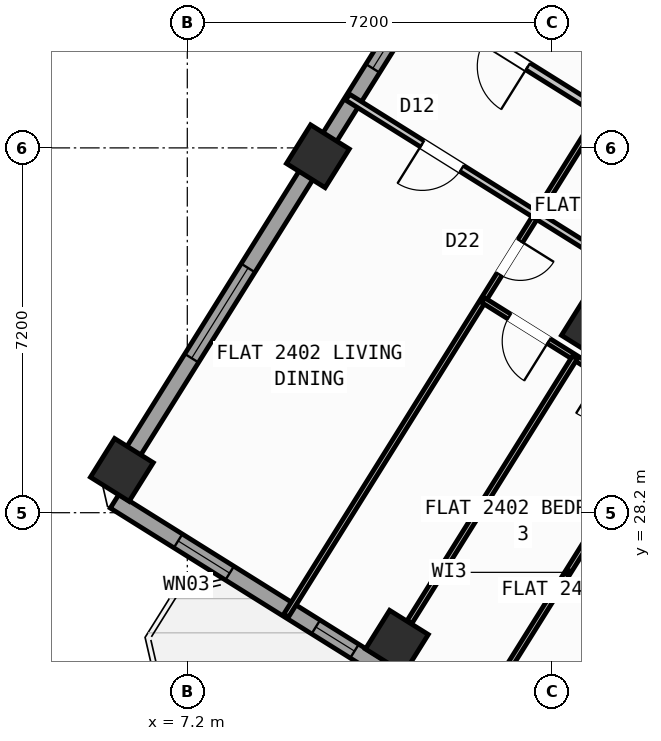
"""IFC4 building model, lengths in metres.
Left out: names, types, materials, properties, quantities, classifications, styles, units other than length and angle.
Written with IfcOpenShell. Run it as: python <this file> out.ifc"""

import sys

from ifc_helpers import new_model, si_unit, direction, frame, frame_2d, origin, origin_2d, place, context, subcontext, project, spatial, rectangle, hollow_rectangle, extrude, source, transform, mapped, element, fill, save


model = new_model("IFC4")
c1 = context("Model", 3, precision=1e-05, world=origin(), true_north=direction((0.0, 1.0)))
c2 = subcontext(c1, "Body", "Model", "MODEL_VIEW")
j1 = project(units=[si_unit("LENGTHUNIT", "METRE"), si_unit("PLANEANGLEUNIT", "RADIAN")], contexts=[c1])
p1 = place(None, origin())
s1 = spatial("IfcSite", under=j1, at=p1, CompositionType="ELEMENT")
p2 = place(p1, origin())
s2 = spatial("IfcBuilding", under=s1, at=p2, CompositionType="ELEMENT")
p3 = place(p2, frame((0.0, 0.0, 97.2)))
s3 = spatial("IfcBuildingStorey", under=s2, at=p3, CompositionType="ELEMENT", Elevation=97.2)
m1 = source(origin(), c2, "Body", "SweptSolid", [
    extrude(hollow_rectangle(XDim=0.9, YDim=0.9, WallThickness=0.036, at=origin_2d()), origin(), (0.0, 0.0, 1.0), 3.6),
])
for number, where, z_axis, x_axis in (
    (1, (15.205, 31.844, 0.0), (0.0, 0.0, 1.0), (-0.848, 0.53, 0.0)),
    (2, (11.336, 25.653, 0.0), (0.0, 0.0, 1.0), (-0.848, 0.53, 0.0)),
    (3, (9.777, 35.235, 0.0), (0.0, 0.0, 1.0), (-0.848, 0.53, 0.0)),
    (4, (5.909, 29.044, 0.0), (0.0, 0.0, 1.0), (-0.848, 0.53, 0.0)),
):
    element("IfcColumn", number, at=place(p3, frame(where, z_axis=z_axis, x_axis=x_axis)), inside=s3, PredefinedType="COLUMN", context=c2, shape_type="MappedRepresentation", body=[
        mapped(m1, transform((0.0, 0.0, 0.0), scale=1.0)),
    ])
p4 = place(p3, frame((31.76, 12.183, 0.0), z_axis=(0.0, 0.0, 1.0), x_axis=(-0.848047074256, 0.529920899612, 0.0)))
e5 = element("IfcWall", 5, at=p4, inside=s3, PredefinedType="STANDARD", context=c2, shape_type="SweptSolid", body=[
    extrude(rectangle(XDim=30.652, YDim=0.32, at=frame_2d((15.326, 0.0))), origin(), (0.0, 0.0, 1.0), 3.32),
])
p5 = place(p4, frame((15.153, 0.0, 0.0)))
e6 = element("IfcOpeningElement", 6, at=p5, cuts=e5, PredefinedType="OPENING", context=c2, shape_type="SweptSolid", body=[
    extrude(rectangle(XDim=1.2, YDim=2.15, at=frame_2d((0.6, 1.075))), frame((0.0, 0.17, 0.0), z_axis=(0.0, -1.0, 0.0), x_axis=(1.0, 0.0, 0.0)), (0.0, 0.0, 1.0), 0.34),
])
p6 = place(p4, frame((2.002, 0.0, 0.8)))
e7 = element("IfcOpeningElement", 7, at=p6, cuts=e5, PredefinedType="OPENING", context=c2, shape_type="SweptSolid", body=[
    extrude(rectangle(XDim=2.1, YDim=1.55, at=frame_2d((1.05, 0.775))), frame((0.0, 0.17, 0.0), z_axis=(0.0, -1.0, 0.0), x_axis=(1.0, 0.0, 0.0)), (0.0, 0.0, 1.0), 0.34),
])
p7 = place(p4, frame((7.206, 0.0, 0.8)))
e8 = element("IfcOpeningElement", 8, at=p7, cuts=e5, PredefinedType="OPENING", context=c2, shape_type="SweptSolid", body=[
    extrude(rectangle(XDim=2.1, YDim=1.55, at=frame_2d((1.05, 0.775))), frame((0.0, 0.17, 0.0), z_axis=(0.0, -1.0, 0.0), x_axis=(1.0, 0.0, 0.0)), (0.0, 0.0, 1.0), 0.34),
])
p8 = place(p4, frame((12.648, 0.0, 1.0)))
e9 = element("IfcOpeningElement", 9, at=p8, cuts=e5, PredefinedType="OPENING", context=c2, shape_type="SweptSolid", body=[
    extrude(rectangle(XDim=0.9, YDim=1.25, at=frame_2d((0.45, 0.625))), frame((0.0, 0.17, 0.0), z_axis=(0.0, -1.0, 0.0), x_axis=(1.0, 0.0, 0.0)), (0.0, 0.0, 1.0), 0.34),
])
p9 = place(p4, frame((27.974, 0.0, 0.95)))
e10 = element("IfcOpeningElement", 10, at=p9, cuts=e5, PredefinedType="OPENING", context=c2, shape_type="SweptSolid", body=[
    extrude(rectangle(XDim=1.2, YDim=1.4, at=frame_2d((0.6, 0.7))), frame((0.0, 0.17, 0.0), z_axis=(0.0, -1.0, 0.0), x_axis=(1.0, 0.0, 0.0)), (0.0, 0.0, 1.0), 0.34),
])
p10 = place(p4, frame((18.347, 0.0, 1.0)))
e11 = element("IfcOpeningElement", 11, at=p10, cuts=e5, PredefinedType="OPENING", context=c2, shape_type="SweptSolid", body=[
    extrude(rectangle(XDim=0.9, YDim=1.25, at=frame_2d((0.45, 0.625))), frame((0.0, 0.17, 0.0), z_axis=(0.0, -1.0, 0.0), x_axis=(1.0, 0.0, 0.0)), (0.0, 0.0, 1.0), 0.34),
])
p11 = place(p4, frame((20.931, 0.0, 1.0)))
e12 = element("IfcOpeningElement", 12, at=p11, cuts=e5, PredefinedType="OPENING", context=c2, shape_type="SweptSolid", body=[
    extrude(rectangle(XDim=0.65, YDim=1.15, at=frame_2d((0.325, 0.575))), frame((0.0, 0.17, 0.0), z_axis=(0.0, -1.0, 0.0), x_axis=(1.0, 0.0, 0.0)), (0.0, 0.0, 1.0), 0.34),
])
p12 = place(p4, frame((22.938, 0.0, 1.0)))
e13 = element("IfcOpeningElement", 13, at=p12, cuts=e5, PredefinedType="OPENING", context=c2, shape_type="SweptSolid", body=[
    extrude(rectangle(XDim=0.9, YDim=1.25, at=frame_2d((0.45, 0.625))), frame((0.0, 0.17, 0.0), z_axis=(0.0, -1.0, 0.0), x_axis=(1.0, 0.0, 0.0)), (0.0, 0.0, 1.0), 0.34),
])
p13 = place(p4, frame((25.069, 0.0, 1.0)))
e14 = element("IfcOpeningElement", 14, at=p13, cuts=e5, PredefinedType="OPENING", context=c2, shape_type="SweptSolid", body=[
    extrude(rectangle(XDim=0.9, YDim=1.25, at=frame_2d((0.45, 0.625))), frame((0.0, 0.17, 0.0), z_axis=(0.0, -1.0, 0.0), x_axis=(1.0, 0.0, 0.0)), (0.0, 0.0, 1.0), 0.34),
])
p14 = place(p3, frame((5.7, 28.71, 0.0), z_axis=(0.0, 0.0, 1.0), x_axis=(0.529923711467, 0.8480453172, 0.0)))
e15 = element("IfcWall", 15, at=p14, inside=s3, PredefinedType="STANDARD", context=c2, shape_type="SweptSolid", body=[
    extrude(rectangle(XDim=21.587, YDim=0.32, at=frame_2d((10.794, 0.0))), origin(), (0.0, 0.0, 1.0), 2.745),
])
p15 = place(p14, frame((2.994, 0.0, 0.8)))
e16 = element("IfcOpeningElement", 16, at=p15, cuts=e15, PredefinedType="OPENING", context=c2, shape_type="SweptSolid", body=[
    extrude(rectangle(XDim=2.1, YDim=1.55, at=frame_2d((1.05, 0.775))), frame((0.0, 0.17, 0.0), z_axis=(0.0, -1.0, 0.0), x_axis=(1.0, 0.0, 0.0)), (0.0, 0.0, 1.0), 0.34),
])
p16 = place(p14, frame((9.739, 0.0, 1.0)))
e17 = element("IfcOpeningElement", 17, at=p16, cuts=e15, PredefinedType="OPENING", context=c2, shape_type="SweptSolid", body=[
    extrude(rectangle(XDim=0.9, YDim=1.25, at=frame_2d((0.45, 0.625))), frame((0.0, 0.17, 0.0), z_axis=(0.0, -1.0, 0.0), x_axis=(1.0, 0.0, 0.0)), (0.0, 0.0, 1.0), 0.34),
])
p17 = place(p14, frame((18.639, 0.0, 0.85)))
e18 = element("IfcOpeningElement", 18, at=p17, cuts=e15, PredefinedType="OPENING", context=c2, shape_type="SweptSolid", body=[
    extrude(rectangle(XDim=1.5, YDim=1.5, at=frame_2d((0.75, 0.75))), frame((0.0, 0.17, 0.0), z_axis=(0.0, -1.0, 0.0), x_axis=(1.0, 0.0, 0.0)), (0.0, 0.0, 1.0), 0.34),
])
p18 = place(p3, frame((26.973, 31.447, 0.0), z_axis=(0.0, 0.0, 1.0), x_axis=(-0.848048310262, 0.529918921593, 0.0)))
e19 = element("IfcWall", 19, at=p18, inside=s3, PredefinedType="PARTITIONING", context=c2, shape_type="SweptSolid", body=[
    extrude(rectangle(XDim=16.73, YDim=0.16, at=frame_2d((8.365, 0.0))), origin(), (0.0, 0.0, 1.0), 3.31),
])
p19 = place(p18, frame((2.22, 0.0, 0.0)))
e20 = element("IfcOpeningElement", 20, at=p19, cuts=e19, PredefinedType="OPENING", context=c2, shape_type="SweptSolid", body=[
    extrude(rectangle(XDim=0.86, YDim=2.05, at=frame_2d((0.43, 1.025))), frame((0.0, 0.09, 0.0), z_axis=(0.0, -1.0, 0.0), x_axis=(1.0, 0.0, 0.0)), (0.0, 0.0, 1.0), 0.18),
])
p20 = place(p18, frame((5.28, 0.0, 0.0)))
e21 = element("IfcOpeningElement", 21, at=p20, cuts=e19, PredefinedType="OPENING", context=c2, shape_type="SweptSolid", body=[
    extrude(rectangle(XDim=1.0, YDim=2.1, at=frame_2d((0.5, 1.05))), frame((0.0, 0.09, 0.0), z_axis=(0.0, -1.0, 0.0), x_axis=(1.0, 0.0, 0.0)), (0.0, 0.0, 1.0), 0.18),
])
p21 = place(p3, frame((25.807, 29.582, 0.0), z_axis=(0.0, 0.0, 1.0), x_axis=(-0.848052408131, 0.529912363569, 0.0)))
e22 = element("IfcWall", 22, at=p21, inside=s3, PredefinedType="PARTITIONING", context=c2, shape_type="SweptSolid", body=[
    extrude(rectangle(XDim=16.73, YDim=0.16, at=frame_2d((8.365, 0.0))), origin(), (0.0, 0.0, 1.0), 3.31),
])
p22 = place(p21, frame((2.22, 0.0, 0.0)))
e23 = element("IfcOpeningElement", 23, at=p22, cuts=e22, PredefinedType="OPENING", context=c2, shape_type="SweptSolid", body=[
    extrude(rectangle(XDim=0.86, YDim=2.05, at=frame_2d((0.43, 1.025))), frame((0.0, 0.09, 0.0), z_axis=(0.0, -1.0, 0.0), x_axis=(1.0, 0.0, 0.0)), (0.0, 0.0, 1.0), 0.18),
])
p23 = place(p21, frame((14.013, 0.0, 0.0)))
e24 = element("IfcOpeningElement", 24, at=p23, cuts=e22, PredefinedType="OPENING", context=c2, shape_type="SweptSolid", body=[
    extrude(rectangle(XDim=1.0, YDim=2.1, at=frame_2d((0.5, 1.05))), frame((0.0, 0.09, 0.0), z_axis=(0.0, -1.0, 0.0), x_axis=(1.0, 0.0, 0.0)), (0.0, 0.0, 1.0), 0.18),
])
p24 = place(p3, frame((15.361, 36.108, 0.0), z_axis=(0.0, 0.0, 1.0), x_axis=(-0.529912802348, -0.848052133956, 0.0)))
e25 = element("IfcWall", 25, at=p24, inside=s3, PredefinedType="PARTITIONING", context=c2, shape_type="SweptSolid", body=[
    extrude(rectangle(XDim=11.72, YDim=0.11, at=frame_2d((5.86, 0.0))), origin(), (0.0, 0.0, 1.0), 2.935),
])
p25 = place(p24, frame((3.0, 0.0, 0.0)))
e26 = element("IfcOpeningElement", 26, at=p25, cuts=e25, PredefinedType="OPENING", context=c2, shape_type="SweptSolid", body=[
    extrude(rectangle(XDim=0.78, YDim=2.05, at=frame_2d((0.39, 1.025))), frame((0.0, 0.065, 0.0), z_axis=(0.0, -1.0, 0.0), x_axis=(1.0, 0.0, 0.0)), (0.0, 0.0, 1.0), 0.13),
])
p26 = place(p3, frame((14.09, 34.073, 0.0), z_axis=(0.0, 0.0, 1.0), x_axis=(-0.848045135007, 0.529924003034, 0.0)))
e27 = element("IfcWall", 27, at=p26, inside=s3, PredefinedType="PLUMBINGWALL", context=c2, shape_type="SweptSolid", body=[
    extrude(rectangle(XDim=4.393, YDim=0.14, at=frame_2d((2.196, 0.0))), origin(), (0.0, 0.0, 1.0), 3.31),
])
p27 = place(p26, frame((1.737, 0.0, 0.0)))
e28 = element("IfcOpeningElement", 28, at=p27, cuts=e27, PredefinedType="OPENING", context=c2, shape_type="SweptSolid", body=[
    extrude(rectangle(XDim=0.92, YDim=2.08, at=frame_2d((0.46, 1.04))), frame((0.0, 0.08, 0.0), z_axis=(0.0, -1.0, 0.0), x_axis=(1.0, 0.0, 0.0)), (0.0, 0.0, 1.0), 0.16),
])
p28 = place(p3, frame((21.321, 29.554, 0.0), z_axis=(0.0, 0.0, 1.0), x_axis=(-0.84803529765, 0.529939745575, 0.0)))
e29 = element("IfcWall", 29, at=p28, inside=s3, PredefinedType="PLUMBINGWALL", context=c2, shape_type="SweptSolid", body=[
    extrude(rectangle(XDim=8.527, YDim=0.14, at=frame_2d((4.264, 0.0))), origin(), (0.0, 0.0, 1.0), 3.31),
])
p29 = place(p28, frame((5.155, 0.0, 0.0)))
e30 = element("IfcOpeningElement", 30, at=p29, cuts=e29, PredefinedType="OPENING", context=c2, shape_type="SweptSolid", body=[
    extrude(rectangle(XDim=0.78, YDim=2.05, at=frame_2d((0.39, 1.025))), frame((0.0, 0.08, 0.0), z_axis=(0.0, -1.0, 0.0), x_axis=(1.0, 0.0, 0.0)), (0.0, 0.0, 1.0), 0.16),
])
p30 = place(p28, frame((1.011, 0.0, 0.0)))
e31 = element("IfcOpeningElement", 31, at=p30, cuts=e29, PredefinedType="OPENING", context=c2, shape_type="SweptSolid", body=[
    extrude(rectangle(XDim=0.78, YDim=2.05, at=frame_2d((0.39, 1.025))), frame((0.0, 0.08, 0.0), z_axis=(0.0, -1.0, 0.0), x_axis=(1.0, 0.0, 0.0)), (0.0, 0.0, 1.0), 0.16),
])
p31 = place(p3, frame((20.272, 27.875, 0.0), z_axis=(0.0, 0.0, 1.0), x_axis=(-0.848056204746, 0.529906287557, 0.0)))
e32 = element("IfcWall", 32, at=p31, inside=s3, PredefinedType="PARTITIONING", context=c2, shape_type="SweptSolid", body=[
    extrude(rectangle(XDim=8.527, YDim=0.11, at=frame_2d((4.264, 0.0))), origin(), (0.0, 0.0, 1.0), 3.31),
])
p32 = place(p31, frame((0.606, 0.0, 0.0)))
e33 = element("IfcOpeningElement", 33, at=p32, cuts=e32, PredefinedType="OPENING", context=c2, shape_type="SweptSolid", body=[
    extrude(rectangle(XDim=0.92, YDim=2.08, at=frame_2d((0.46, 1.04))), frame((0.0, 0.065, 0.0), z_axis=(0.0, -1.0, 0.0), x_axis=(1.0, 0.0, 0.0)), (0.0, 0.0, 1.0), 0.13),
])
p33 = place(p31, frame((2.738, 0.0, 0.0)))
e34 = element("IfcOpeningElement", 34, at=p33, cuts=e32, PredefinedType="OPENING", context=c2, shape_type="SweptSolid", body=[
    extrude(rectangle(XDim=0.92, YDim=2.08, at=frame_2d((0.46, 1.04))), frame((0.0, 0.065, 0.0), z_axis=(0.0, -1.0, 0.0), x_axis=(1.0, 0.0, 0.0)), (0.0, 0.0, 1.0), 0.13),
])
p34 = place(p31, frame((4.869, 0.0, 0.0)))
e35 = element("IfcOpeningElement", 35, at=p34, cuts=e32, PredefinedType="OPENING", context=c2, shape_type="SweptSolid", body=[
    extrude(rectangle(XDim=0.92, YDim=2.08, at=frame_2d((0.46, 1.04))), frame((0.0, 0.065, 0.0), z_axis=(0.0, -1.0, 0.0), x_axis=(1.0, 0.0, 0.0)), (0.0, 0.0, 1.0), 0.13),
])
p35 = place(p31, frame((7.001, 0.0, 0.0)))
e36 = element("IfcOpeningElement", 36, at=p35, cuts=e32, PredefinedType="OPENING", context=c2, shape_type="SweptSolid", body=[
    extrude(rectangle(XDim=0.92, YDim=2.08, at=frame_2d((0.46, 1.04))), frame((0.0, 0.065, 0.0), z_axis=(0.0, -1.0, 0.0), x_axis=(1.0, 0.0, 0.0)), (0.0, 0.0, 1.0), 0.13),
])
for number, where, z_axis, x_axis in (
    (37, (18.464, 29.005, 0.0), (0.0, 0.0, 1.0), (-0.53, -0.848, 0.0)),
    (38, (16.656, 30.135, 0.0), (0.0, 0.0, 1.0), (-0.53, -0.848, 0.0)),
):
    element("IfcWall", number, at=place(p3, frame(where, z_axis=z_axis, x_axis=x_axis)), inside=s3, PredefinedType="PARTITIONING", context=c2, shape_type="SweptSolid", body=[
        extrude(rectangle(XDim=7.34, YDim=0.11, at=frame_2d((3.67, 0.0))), origin(), (0.0, 0.0, 1.0), 2.935),
    ])
p36 = place(p3, frame((14.848, 31.264, 0.0), z_axis=(0.0, 0.0, 1.0), x_axis=(-0.529920534869, -0.848047302174, 0.0)))
e39 = element("IfcWall", 39, at=p36, inside=s3, PredefinedType="PARTITIONING", context=c2, shape_type="SweptSolid", body=[
    extrude(rectangle(XDim=6.158, YDim=0.11, at=frame_2d((3.079, 0.0))), origin(), (0.0, 0.0, 1.0), 2.745),
])
m2 = source(origin(), c2, "Body", "SweptSolid", [
    extrude(rectangle(XDim=1.2, YDim=1.4, at=frame_2d((0.6, 0.7))), frame((0.0, 0.03, 0.0), z_axis=(0.0, -1.0, 0.0), x_axis=(1.0, 0.0, 0.0)), (0.0, 0.0, 1.0), 0.06),
])
p37 = place(p9, origin())
e40 = element("IfcWindow", 40, at=p37, inside=s3, PartitioningType="SINGLE_PANEL", PredefinedType="WINDOW", context=c2, shape_type="MappedRepresentation", body=[
    mapped(m2, transform((0.0, 0.0, 0.0), scale=1.0)),
])
fill(e10, e40)
m3 = source(origin(), c2, "Body", "SweptSolid", [
    extrude(rectangle(XDim=2.1, YDim=1.55, at=frame_2d((1.05, 0.775))), frame((0.0, 0.03, 0.0), z_axis=(0.0, -1.0, 0.0), x_axis=(1.0, 0.0, 0.0)), (0.0, 0.0, 1.0), 0.06),
])
p38 = place(p15, origin())
e41 = element("IfcWindow", 41, at=p38, inside=s3, PartitioningType="SINGLE_PANEL", PredefinedType="WINDOW", context=c2, shape_type="MappedRepresentation", body=[
    mapped(m3, transform((0.0, 0.0, 0.0), scale=1.0)),
])
fill(e16, e41)
m4 = source(origin(), c2, "Body", "SweptSolid", [
    extrude(rectangle(XDim=0.9, YDim=1.25, at=frame_2d((0.45, 0.625))), frame((0.0, 0.03, 0.0), z_axis=(0.0, -1.0, 0.0), x_axis=(1.0, 0.0, 0.0)), (0.0, 0.0, 1.0), 0.06),
])
p39 = place(p16, origin())
e42 = element("IfcWindow", 42, at=p39, inside=s3, PartitioningType="SINGLE_PANEL", PredefinedType="WINDOW", context=c2, shape_type="MappedRepresentation", body=[
    mapped(m4, transform((0.0, 0.0, 0.0), scale=1.0)),
])
fill(e17, e42)
p40 = place(p13, origin())
e43 = element("IfcWindow", 43, at=p40, inside=s3, PartitioningType="SINGLE_PANEL", PredefinedType="WINDOW", context=c2, shape_type="MappedRepresentation", body=[
    mapped(m4, transform((0.0, 0.0, 0.0), scale=1.0)),
])
fill(e14, e43)
m5 = source(origin(), c2, "Body", "SweptSolid", [
    extrude(rectangle(XDim=1.0, YDim=2.1, at=frame_2d((0.5, 1.05))), frame((0.0, 0.025, 0.0), z_axis=(0.0, -1.0, 0.0), x_axis=(1.0, 0.0, 0.0)), (0.0, 0.0, 1.0), 0.05),
])
p41 = place(p23, origin())
e44 = element("IfcDoor", 44, at=p41, inside=s3, OperationType="SINGLE_SWING_LEFT", PredefinedType="DOOR", context=c2, shape_type="MappedRepresentation", body=[
    mapped(m5, transform((0.0, 0.0, 0.0), scale=1.0)),
])
fill(e24, e44)
m6 = source(origin(), c2, "Body", "SweptSolid", [
    extrude(rectangle(XDim=0.92, YDim=2.08, at=frame_2d((0.46, 1.04))), frame((0.0, 0.025, 0.0), z_axis=(0.0, -1.0, 0.0), x_axis=(1.0, 0.0, 0.0)), (0.0, 0.0, 1.0), 0.05),
])
p42 = place(p27, origin())
e45 = element("IfcDoor", 45, at=p42, inside=s3, OperationType="SINGLE_SWING_RIGHT", PredefinedType="DOOR", context=c2, shape_type="MappedRepresentation", body=[
    mapped(m6, transform((0.0, 0.0, 0.0), scale=1.0)),
])
fill(e28, e45)
m7 = source(origin(), c2, "Body", "SweptSolid", [
    extrude(rectangle(XDim=0.78, YDim=2.05, at=frame_2d((0.39, 1.025))), frame((0.0, 0.025, 0.0), z_axis=(0.0, -1.0, 0.0), x_axis=(1.0, 0.0, 0.0)), (0.0, 0.0, 1.0), 0.05),
])
p43 = place(p25, origin())
e46 = element("IfcDoor", 46, at=p43, inside=s3, OperationType="SINGLE_SWING_LEFT", PredefinedType="DOOR", context=c2, shape_type="MappedRepresentation", body=[
    mapped(m7, transform((0.0, 0.0, 0.0), scale=1.0)),
])
fill(e26, e46)
p44 = place(p35, origin())
e47 = element("IfcDoor", 47, at=p44, inside=s3, OperationType="SINGLE_SWING_LEFT", PredefinedType="DOOR", context=c2, shape_type="MappedRepresentation", body=[
    mapped(m6, transform((0.0, 0.0, 0.0), scale=1.0)),
])
fill(e36, e47)
save(model, sys.argv[1])
